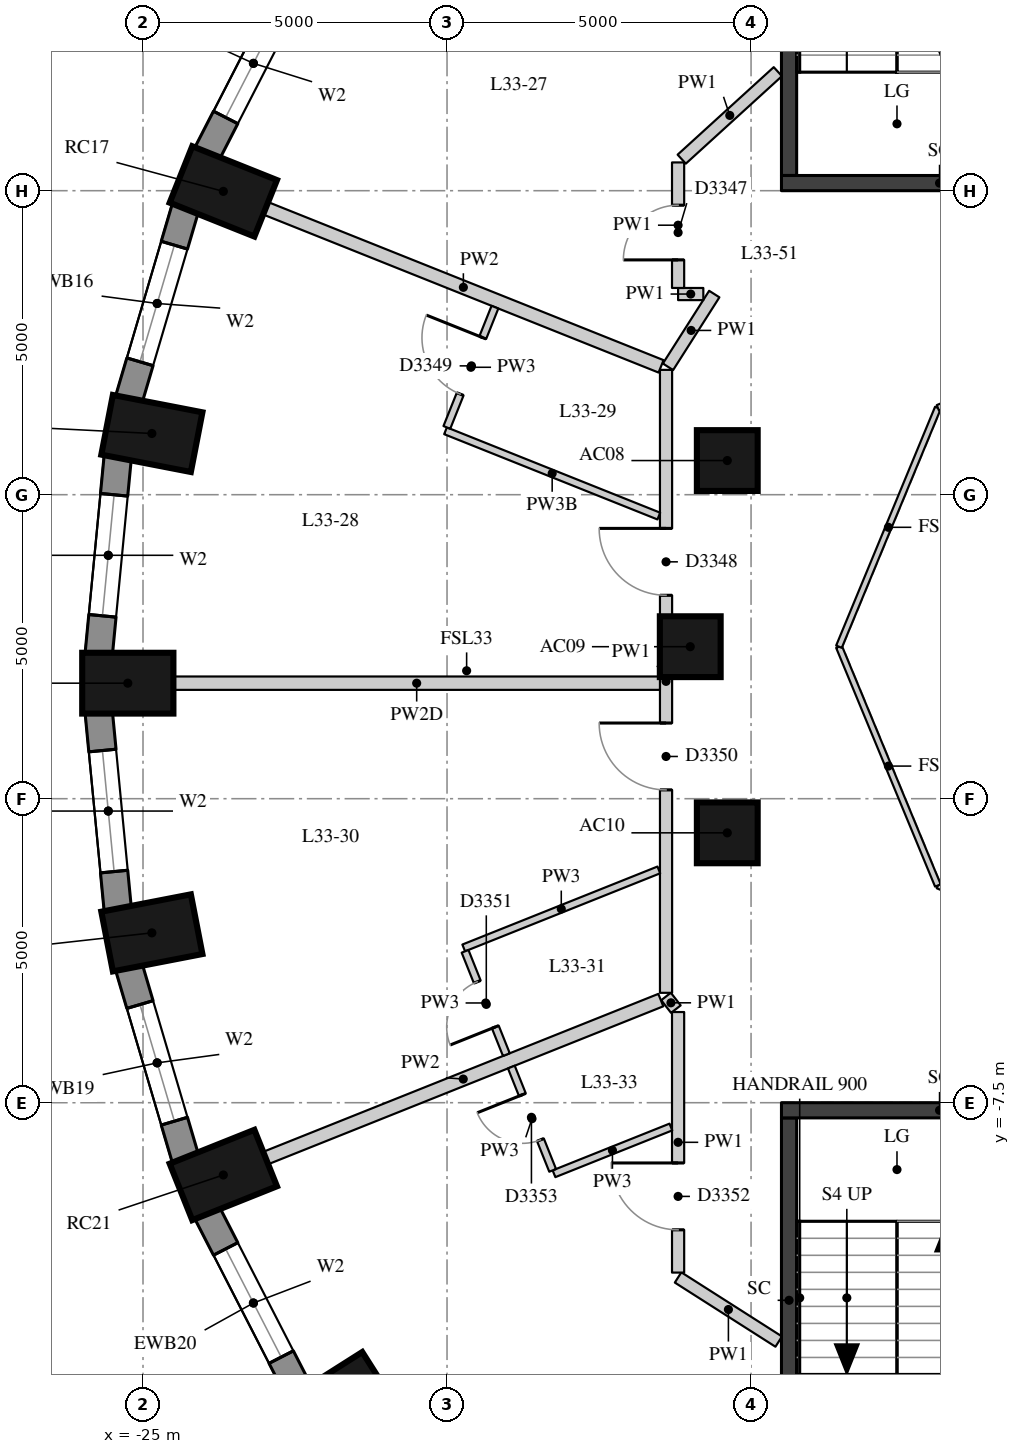
"""IFC4 building model, lengths in metres.
Left out: names, types, materials, properties, quantities, classifications, styles, units other than length and angle.
Written with IfcOpenShell. Run it as: python <this file> out.ifc"""

import sys

from ifc_helpers import new_model, si_unit, direction, frame, frame_2d, origin, origin_2d, place, context, subcontext, project, spatial, rectangle, extrude, element, fill, save


model = new_model("IFC4")
c1 = context("Model", 3, precision=1e-05, world=origin(), true_north=direction((0.0, 1.0)))
c2 = subcontext(c1, "Body", "Model", "MODEL_VIEW")
j1 = project(units=[si_unit("LENGTHUNIT", "METRE"), si_unit("PLANEANGLEUNIT", "RADIAN")], contexts=[c1])
p1 = place(None, origin())
s1 = spatial("IfcSite", under=j1, at=p1, CompositionType="ELEMENT")
p2 = place(p1, origin())
s2 = spatial("IfcBuilding", under=s1, at=p2, CompositionType="ELEMENT")
p3 = place(p2, frame((0.0, 0.0, 118.6)))
s3 = spatial("IfcBuildingStorey", under=s2, at=p3, CompositionType="ELEMENT", Elevation=118.6)
for number, where, z_axis, x_axis in (
    (1, (-23.679, 7.489, 0.0), (0.0, 0.0, 1.0), (-0.929, 0.371, 0.0)),
    (2, (-24.854, 3.507, 0.0), (0.0, 0.0, 1.0), (-0.982, 0.19, 0.0)),
    (3, (-25.25, -0.6, 0.0), (0.0, 0.0, 1.0), (-1.0, 0.0, 0.0)),
    (4, (-24.854, -4.707, 0.0), (0.0, 0.0, 1.0), (-0.982, -0.19, 0.0)),
    (5, (-23.679, -8.689, 0.0), (0.0, 0.0, 1.0), (-0.929, -0.371, 0.0)),
    (6, (-21.76, -12.425, 0.0), (0.0, 0.0, 1.0), (-0.845, -0.536, 0.0)),
):
    element("IfcColumn", number, at=place(p3, frame(where, z_axis=z_axis, x_axis=x_axis)), inside=s3, PredefinedType="COLUMN", context=c2, shape_type="SweptSolid", body=[
        extrude(rectangle(XDim=1.5, YDim=1.0, at=origin_2d()), origin(), (0.0, 0.0, 1.0), 3.3),
    ])
for number, where, z_axis, x_axis in (
    (7, (-15.391, 3.062, 0.0), (0.0, 0.0, 1.0), (1.0, 0.0, 0.0)),
    (8, (-16.0, 0.0, 0.0), (0.0, 0.0, 1.0), (1.0, 0.0, 0.0)),
    (9, (-15.391, -3.062, 0.0), (0.0, 0.0, 1.0), (1.0, 0.0, 0.0)),
):
    element("IfcColumn", number, at=place(p3, frame(where, z_axis=z_axis, x_axis=x_axis)), inside=s3, PredefinedType="COLUMN", context=c2, shape_type="SweptSolid", body=[
        extrude(rectangle(XDim=1.0, YDim=1.0, at=origin_2d()), origin(), (0.0, 0.0, 1.0), 3.3),
    ])
p4 = place(p3, frame((-22.423, 11.077, 0.0), z_axis=(0.0, 0.0, 1.0), x_axis=(-0.456828186229, -0.889554949549, 0.0)))
e10 = element("IfcWall", 10, at=p4, inside=s3, PredefinedType="SOLIDWALL", context=c2, shape_type="SweptSolid", body=[
    extrude(rectangle(XDim=3.333, YDim=0.45, at=frame_2d((1.667, 0.0))), origin(), (0.0, 0.0, 1.0), 3.02),
])
p5 = place(p4, frame((0.666, 0.0, 0.4)))
e11 = element("IfcOpeningElement", 11, at=p5, cuts=e10, PredefinedType="OPENING", context=c2, shape_type="SweptSolid", body=[
    extrude(rectangle(XDim=2.0, YDim=1.75, at=frame_2d((1.0, 0.875))), frame((0.0, 0.235, 0.0), z_axis=(0.0, -1.0, 0.0), x_axis=(1.0, 0.0, 0.0)), (0.0, 0.0, 1.0), 0.47),
])
p6 = place(p3, frame((-24.302, 7.221, 0.0), z_axis=(0.0, 0.0, 1.0), x_axis=(-0.283071248438, -0.959098883488, 0.0)))
e12 = element("IfcWall", 12, at=p6, inside=s3, PredefinedType="SOLIDWALL", context=c2, shape_type="SweptSolid", body=[
    extrude(rectangle(XDim=3.286, YDim=0.45, at=frame_2d((1.643, 0.0))), origin(), (0.0, 0.0, 1.0), 3.02),
])
p7 = place(p6, frame((0.643, 0.0, 0.4)))
e13 = element("IfcOpeningElement", 13, at=p7, cuts=e12, PredefinedType="OPENING", context=c2, shape_type="SweptSolid", body=[
    extrude(rectangle(XDim=2.0, YDim=1.75, at=frame_2d((1.0, 0.875))), frame((0.0, 0.235, 0.0), z_axis=(0.0, -1.0, 0.0), x_axis=(1.0, 0.0, 0.0)), (0.0, 0.0, 1.0), 0.47),
])
p8 = place(p3, frame((-25.415, 3.126, 0.0), z_axis=(0.0, 0.0, 1.0), x_axis=(-0.095967726544, -0.995384446062, 0.0)))
e14 = element("IfcWall", 14, at=p8, inside=s3, PredefinedType="SOLIDWALL", context=c2, shape_type="SweptSolid", body=[
    extrude(rectangle(XDim=3.261, YDim=0.45, at=frame_2d((1.631, 0.0))), origin(), (0.0, 0.0, 1.0), 3.02),
])
p9 = place(p8, frame((0.631, 0.0, 0.4)))
e15 = element("IfcOpeningElement", 15, at=p9, cuts=e14, PredefinedType="OPENING", context=c2, shape_type="SweptSolid", body=[
    extrude(rectangle(XDim=2.0, YDim=1.75, at=frame_2d((1.0, 0.875))), frame((0.0, 0.235, 0.0), z_axis=(0.0, -1.0, 0.0), x_axis=(1.0, 0.0, 0.0)), (0.0, 0.0, 1.0), 0.47),
])
p10 = place(p3, frame((-25.728, -1.08, 0.0), z_axis=(0.0, 0.0, 1.0), x_axis=(0.095967726544, -0.995384446062, 0.0)))
e16 = element("IfcWall", 16, at=p10, inside=s3, PredefinedType="SOLIDWALL", context=c2, shape_type="SweptSolid", body=[
    extrude(rectangle(XDim=3.261, YDim=0.45, at=frame_2d((1.631, 0.0))), origin(), (0.0, 0.0, 1.0), 3.02),
])
p11 = place(p10, frame((0.631, 0.0, 0.4)))
e17 = element("IfcOpeningElement", 17, at=p11, cuts=e16, PredefinedType="OPENING", context=c2, shape_type="SweptSolid", body=[
    extrude(rectangle(XDim=2.0, YDim=1.75, at=frame_2d((1.0, 0.875))), frame((0.0, 0.235, 0.0), z_axis=(0.0, -1.0, 0.0), x_axis=(1.0, 0.0, 0.0)), (0.0, 0.0, 1.0), 0.47),
])
p12 = place(p3, frame((-25.232, -5.269, 0.0), z_axis=(0.0, 0.0, 1.0), x_axis=(0.283051078697, -0.959104836214, 0.0)))
e18 = element("IfcWall", 18, at=p12, inside=s3, PredefinedType="SOLIDWALL", context=c2, shape_type="SweptSolid", body=[
    extrude(rectangle(XDim=3.286, YDim=0.45, at=frame_2d((1.643, 0.0))), origin(), (0.0, 0.0, 1.0), 3.02),
])
p13 = place(p12, frame((0.643, 0.0, 0.4)))
e19 = element("IfcOpeningElement", 19, at=p13, cuts=e18, PredefinedType="OPENING", context=c2, shape_type="SweptSolid", body=[
    extrude(rectangle(XDim=2.0, YDim=1.75, at=frame_2d((1.0, 0.875))), frame((0.0, 0.235, 0.0), z_axis=(0.0, -1.0, 0.0), x_axis=(1.0, 0.0, 0.0)), (0.0, 0.0, 1.0), 0.47),
])
p14 = place(p3, frame((-23.945, -9.312, 0.0), z_axis=(0.0, 0.0, 1.0), x_axis=(0.456828186229, -0.889554949549, 0.0)))
e20 = element("IfcWall", 20, at=p14, inside=s3, PredefinedType="SOLIDWALL", context=c2, shape_type="SweptSolid", body=[
    extrude(rectangle(XDim=3.333, YDim=0.45, at=frame_2d((1.667, 0.0))), origin(), (0.0, 0.0, 1.0), 3.02),
])
p15 = place(p14, frame((0.666, 0.0, 0.4)))
e21 = element("IfcOpeningElement", 21, at=p15, cuts=e20, PredefinedType="OPENING", context=c2, shape_type="SweptSolid", body=[
    extrude(rectangle(XDim=2.0, YDim=1.75, at=frame_2d((1.0, 0.875))), frame((0.0, 0.235, 0.0), z_axis=(0.0, -1.0, 0.0), x_axis=(1.0, 0.0, 0.0)), (0.0, 0.0, 1.0), 0.47),
])
p16 = place(p3, frame((-14.375, 7.75, -0.28), z_axis=(0.0, 0.0, 1.0), x_axis=(0.0, 1.0, 0.0)))
e22 = element("IfcWall", 22, at=p16, inside=s3, PredefinedType="SHEAR", context=c2, shape_type="SweptSolid", body=[
    extrude(rectangle(XDim=6.0, YDim=0.25, at=frame_2d((3.0, 0.0))), origin(), (0.0, 0.0, 1.0), 3.3),
])
p17 = place(p3, frame((-14.5, 7.625, -0.28), z_axis=(0.0, 0.0, 1.0), x_axis=(1.0, 0.0, 0.0)))
e23 = element("IfcWall", 23, at=p17, inside=s3, PredefinedType="SHEAR", context=c2, shape_type="SweptSolid", body=[
    extrude(rectangle(XDim=5.2, YDim=0.25, at=frame_2d((2.6, 0.0))), origin(), (0.0, 0.0, 1.0), 3.3),
])
p18 = place(p3, frame((-14.375, -13.75, -0.28), z_axis=(0.0, 0.0, 1.0), x_axis=(0.0, 1.0, 0.0)))
e24 = element("IfcWall", 24, at=p18, inside=s3, PredefinedType="SHEAR", context=c2, shape_type="SweptSolid", body=[
    extrude(rectangle(XDim=6.0, YDim=0.25, at=frame_2d((3.0, 0.0))), origin(), (0.0, 0.0, 1.0), 3.3),
])
p19 = place(p3, frame((-14.5, -7.625, -0.28), z_axis=(0.0, 0.0, 1.0), x_axis=(1.0, 0.0, 0.0)))
e25 = element("IfcWall", 25, at=p19, inside=s3, PredefinedType="SHEAR", context=c2, shape_type="SweptSolid", body=[
    extrude(rectangle(XDim=5.2, YDim=0.25, at=frame_2d((2.6, 0.0))), origin(), (0.0, 0.0, 1.0), 3.3),
])
p20 = place(p3, frame((-14.545, -11.429, 0.0), z_axis=(0.0, 0.0, 1.0), x_axis=(-0.843261732334, 0.537503163507, 0.0)))
e26 = element("IfcWall", 26, at=p20, inside=s3, PredefinedType="PARTITIONING", context=c2, shape_type="SweptSolid", body=[
    extrude(rectangle(XDim=1.963, YDim=0.2, at=frame_2d((0.981, 0.0))), origin(), (0.0, 0.0, 1.0), 3.02),
])
p21 = place(p3, frame((-16.2, -10.294, 0.0), z_axis=(0.0, 0.0, 1.0), x_axis=(0.0, 1.0, 0.0)))
e27 = element("IfcWall", 27, at=p21, inside=s3, PredefinedType="PARTITIONING", context=c2, shape_type="SweptSolid", body=[
    extrude(rectangle(XDim=4.285, YDim=0.2, at=frame_2d((2.143, 0.0))), origin(), (0.0, 0.0, 1.0), 3.02),
])
p22 = place(p21, frame((0.703, 0.0, 0.0)))
e28 = element("IfcOpeningElement", 28, at=p22, cuts=e27, PredefinedType="OPENING", context=c2, shape_type="SweptSolid", body=[
    extrude(rectangle(XDim=1.1, YDim=2.1, at=frame_2d((0.55, 1.05))), frame((0.0, 0.11, 0.0), z_axis=(0.0, -1.0, 0.0), x_axis=(1.0, 0.0, 0.0)), (0.0, 0.0, 1.0), 0.22),
])
p23 = place(p3, frame((-16.237, -5.961, 0.0), z_axis=(0.0, 0.0, 1.0), x_axis=(-0.61310674242, 0.790000077468, 0.0)))
e29 = element("IfcWall", 29, at=p23, inside=s3, PredefinedType="PARTITIONING", context=c2, shape_type="SweptSolid", body=[
    extrude(rectangle(XDim=0.264, YDim=0.2, at=frame_2d((0.132, 0.0))), origin(), (0.0, 0.0, 1.0), 3.02),
])
p24 = place(p3, frame((-16.398, -5.693, 0.0), z_axis=(0.0, 0.0, 1.0), x_axis=(0.0, 1.0, 0.0)))
e30 = element("IfcWall", 30, at=p24, inside=s3, PredefinedType="PARTITIONING", context=c2, shape_type="SweptSolid", body=[
    extrude(rectangle(XDim=10.246, YDim=0.2, at=frame_2d((5.123, 0.0))), origin(), (0.0, 0.0, 1.0), 3.02),
])
p25 = place(p24, frame((6.539, 0.0, 0.0)))
e31 = element("IfcOpeningElement", 31, at=p25, cuts=e30, PredefinedType="OPENING", context=c2, shape_type="SweptSolid", body=[
    extrude(rectangle(XDim=1.1, YDim=2.1, at=frame_2d((0.55, 1.05))), frame((0.0, 0.11, 0.0), z_axis=(0.0, -1.0, 0.0), x_axis=(1.0, 0.0, 0.0)), (0.0, 0.0, 1.0), 0.22),
])
p26 = place(p24, frame((3.337, 0.0, 0.0)))
e32 = element("IfcOpeningElement", 32, at=p26, cuts=e30, PredefinedType="OPENING", context=c2, shape_type="SweptSolid", body=[
    extrude(rectangle(XDim=1.1, YDim=2.1, at=frame_2d((0.55, 1.05))), frame((0.0, 0.11, 0.0), z_axis=(0.0, -1.0, 0.0), x_axis=(1.0, 0.0, 0.0)), (0.0, 0.0, 1.0), 0.22),
])
p27 = place(p3, frame((-16.366, 4.604, 0.0), z_axis=(0.0, 0.0, 1.0), x_axis=(0.536775234189, 0.843725279911, 0.0)))
e33 = element("IfcWall", 33, at=p27, inside=s3, PredefinedType="PARTITIONING", context=c2, shape_type="SweptSolid", body=[
    extrude(rectangle(XDim=1.418, YDim=0.2, at=frame_2d((0.709, 0.0))), origin(), (0.0, 0.0, 1.0), 3.02),
])
p28 = place(p3, frame((-15.785, 5.8, 0.0), z_axis=(0.0, 0.0, 1.0), x_axis=(-1.0, 0.0, 0.0)))
e34 = element("IfcWall", 34, at=p28, inside=s3, PredefinedType="PARTITIONING", context=c2, shape_type="SweptSolid", body=[
    extrude(rectangle(XDim=0.415, YDim=0.2, at=frame_2d((0.208, 0.0))), origin(), (0.0, 0.0, 1.0), 3.02),
])
p29 = place(p3, frame((-16.2, 5.9, 0.0), z_axis=(0.0, 0.0, 1.0), x_axis=(0.0, 1.0, 0.0)))
e35 = element("IfcWall", 35, at=p29, inside=s3, PredefinedType="PARTITIONING", context=c2, shape_type="SweptSolid", body=[
    extrude(rectangle(XDim=2.065, YDim=0.2, at=frame_2d((1.032, 0.0))), origin(), (0.0, 0.0, 1.0), 3.02),
])
p30 = place(p29, frame((0.462, 0.0, 0.0)))
e36 = element("IfcOpeningElement", 36, at=p30, cuts=e35, PredefinedType="OPENING", context=c2, shape_type="SweptSolid", body=[
    extrude(rectangle(XDim=0.9, YDim=2.1, at=frame_2d((0.45, 1.05))), frame((0.0, 0.11, 0.0), z_axis=(0.0, -1.0, 0.0), x_axis=(1.0, 0.0, 0.0)), (0.0, 0.0, 1.0), 0.22),
])
p31 = place(p3, frame((-16.14, 8.019, 0.0), z_axis=(0.0, 0.0, 1.0), x_axis=(0.739392120684, 0.673275049197, 0.0)))
e37 = element("IfcWall", 37, at=p31, inside=s3, PredefinedType="PARTITIONING", context=c2, shape_type="SweptSolid", body=[
    extrude(rectangle(XDim=2.138, YDim=0.2, at=frame_2d((1.069, 0.0))), origin(), (0.0, 0.0, 1.0), 3.02),
])
p32 = place(p3, frame((-22.983, 7.21, 0.0), z_axis=(0.0, 0.0, 1.0), x_axis=(0.928548801607, -0.371210348771, 0.0)))
e38 = element("IfcWall", 38, at=p32, inside=s3, PredefinedType="PARTITIONING", context=c2, shape_type="SweptSolid", body=[
    extrude(rectangle(XDim=7.003, YDim=0.22, at=frame_2d((3.501, 0.0))), origin(), (0.0, 0.0, 1.0), 3.02),
])
p33 = place(p3, frame((-24.5, -0.6, 0.0), z_axis=(0.0, 0.0, 1.0), x_axis=(1.0, 0.0, 0.0)))
e39 = element("IfcWall", 39, at=p33, inside=s3, PredefinedType="PARTITIONING", context=c2, shape_type="SweptSolid", body=[
    extrude(rectangle(XDim=8.002, YDim=0.22, at=frame_2d((4.001, 0.0))), origin(), (0.0, 0.0, 1.0), 2.47),
])
p34 = place(p3, frame((-22.983, -8.41, 0.0), z_axis=(0.0, 0.0, 1.0), x_axis=(0.928551252469, 0.371204218105, 0.0)))
e40 = element("IfcWall", 40, at=p34, inside=s3, PredefinedType="PARTITIONING", context=c2, shape_type="SweptSolid", body=[
    extrude(rectangle(XDim=6.999, YDim=0.22, at=frame_2d((3.499, 0.0))), origin(), (0.0, 0.0, 1.0), 3.02),
])
p35 = place(p3, frame((-16.517, 2.148, 0.0), z_axis=(0.0, 0.0, 1.0), x_axis=(-0.928534615374, 0.37124583237, 0.0)))
e41 = element("IfcWall", 41, at=p35, inside=s3, PredefinedType="PARTITIONING", context=c2, shape_type="SweptSolid", body=[
    extrude(rectangle(XDim=3.778, YDim=0.12, at=frame_2d((1.889, 0.0))), origin(), (0.0, 0.0, 1.0), 2.47),
])
p36 = place(p3, frame((-16.517, -3.672, 0.0), z_axis=(0.0, 0.0, 1.0), x_axis=(-0.928554629191, -0.371195771268, 0.0)))
e42 = element("IfcWall", 42, at=p36, inside=s3, PredefinedType="PARTITIONING", context=c2, shape_type="SweptSolid", body=[
    extrude(rectangle(XDim=3.456, YDim=0.12, at=frame_2d((1.728, 0.0))), origin(), (0.0, 0.0, 1.0), 3.02),
])
p37 = place(p3, frame((-16.319, -7.9, 0.0), z_axis=(0.0, 0.0, 1.0), x_axis=(-0.92852548478, -0.371268668371, 0.0)))
e43 = element("IfcWall", 43, at=p37, inside=s3, PredefinedType="PARTITIONING", context=c2, shape_type="SweptSolid", body=[
    extrude(rectangle(XDim=2.07, YDim=0.12, at=frame_2d((1.035, 0.0))), origin(), (0.0, 0.0, 1.0), 3.02),
])
p38 = place(p3, frame((-20.003, 3.607, 0.0), z_axis=(0.0, 0.0, 1.0), x_axis=(0.371351153758, 0.928492498948, 0.0)))
e44 = element("IfcWall", 44, at=p38, inside=s3, PredefinedType="PARTITIONING", context=c2, shape_type="SweptSolid", body=[
    extrude(rectangle(XDim=2.13, YDim=0.12, at=frame_2d((1.065, 0.0))), origin(), (0.0, 0.0, 1.0), 3.02),
])
p39 = place(p38, frame((0.59, 0.0, 0.0)))
e45 = element("IfcOpeningElement", 45, at=p39, cuts=e44, PredefinedType="OPENING", context=c2, shape_type="SweptSolid", body=[
    extrude(rectangle(XDim=1.0, YDim=2.1, at=frame_2d((0.5, 1.05))), frame((0.0, 0.07, 0.0), z_axis=(0.0, -1.0, 0.0), x_axis=(1.0, 0.0, 0.0)), (0.0, 0.0, 1.0), 0.14),
])
p40 = place(p3, frame((-19.703, -5.01, 0.0), z_axis=(0.0, 0.0, 1.0), x_axis=(0.371229680537, -0.928541073022, 0.0)))
e46 = element("IfcWall", 46, at=p40, inside=s3, PredefinedType="PARTITIONING", context=c2, shape_type="SweptSolid", body=[
    extrude(rectangle(XDim=1.83, YDim=0.12, at=frame_2d((0.915, 0.0))), origin(), (0.0, 0.0, 1.0), 3.02),
])
p41 = place(p40, frame((0.54, 0.0, 0.0)))
e47 = element("IfcOpeningElement", 47, at=p41, cuts=e46, PredefinedType="OPENING", context=c2, shape_type="SweptSolid", body=[
    extrude(rectangle(XDim=0.8, YDim=2.1, at=frame_2d((0.4, 1.05))), frame((0.0, 0.07, 0.0), z_axis=(0.0, -1.0, 0.0), x_axis=(1.0, 0.0, 0.0)), (0.0, 0.0, 1.0), 0.14),
])
p42 = place(p3, frame((-18.263, -8.613, 0.0), z_axis=(0.0, 0.0, 1.0), x_axis=(-0.371229680537, 0.928541073022, 0.0)))
e48 = element("IfcWall", 48, at=p42, inside=s3, PredefinedType="PARTITIONING", context=c2, shape_type="SweptSolid", body=[
    extrude(rectangle(XDim=1.83, YDim=0.12, at=frame_2d((0.915, 0.0))), origin(), (0.0, 0.0, 1.0), 3.02),
])
p43 = place(p42, frame((0.54, 0.0, 0.0)))
e49 = element("IfcOpeningElement", 49, at=p43, cuts=e48, PredefinedType="OPENING", context=c2, shape_type="SweptSolid", body=[
    extrude(rectangle(XDim=0.8, YDim=2.1, at=frame_2d((0.4, 1.05))), frame((0.0, 0.07, 0.0), z_axis=(0.0, -1.0, 0.0), x_axis=(1.0, 0.0, 0.0)), (0.0, 0.0, 1.0), 0.14),
])
for number, where, z_axis, x_axis in (
    (50, (-8.0, -5.554, 0.0), (0.0, 0.0, 1.0), (-0.924, 0.383, 0.0)),
    (51, (-11.927, -3.927, 0.0), (0.0, 0.0, 1.0), (-0.383, 0.924, 0.0)),
    (52, (-13.554, 0.0, 0.0), (0.0, 0.0, 1.0), (0.383, 0.924, 0.0)),
    (53, (-11.927, 3.927, 0.0), (0.0, 0.0, 1.0), (0.924, 0.383, 0.0)),
):
    element("IfcWall", number, at=place(p3, frame(where, z_axis=z_axis, x_axis=x_axis)), inside=s3, PredefinedType="PARTITIONING", context=c2, shape_type="SweptSolid", body=[
        extrude(rectangle(XDim=4.251, YDim=0.1, at=frame_2d((2.125, 0.0))), origin(), (0.0, 0.0, 1.0), 3.02),
    ])
p44 = place(p5, origin())
e54 = element("IfcWindow", 54, at=p44, inside=s3, PartitioningType="SINGLE_PANEL", PredefinedType="WINDOW", context=c2, shape_type="SweptSolid", body=[
    extrude(rectangle(XDim=2.0, YDim=1.75, at=frame_2d((1.0, 0.875))), frame((0.0, 0.035, 0.0), z_axis=(0.0, -1.0, 0.0), x_axis=(1.0, 0.0, 0.0)), (0.0, 0.0, 1.0), 0.06),
])
fill(e11, e54)
p45 = place(p7, origin())
e55 = element("IfcWindow", 55, at=p45, inside=s3, PartitioningType="SINGLE_PANEL", PredefinedType="WINDOW", context=c2, shape_type="SweptSolid", body=[
    extrude(rectangle(XDim=2.0, YDim=1.75, at=frame_2d((1.0, 0.875))), frame((0.0, 0.035, 0.0), z_axis=(0.0, -1.0, 0.0), x_axis=(1.0, 0.0, 0.0)), (0.0, 0.0, 1.0), 0.06),
])
fill(e13, e55)
p46 = place(p9, origin())
e56 = element("IfcWindow", 56, at=p46, inside=s3, PartitioningType="SINGLE_PANEL", PredefinedType="WINDOW", context=c2, shape_type="SweptSolid", body=[
    extrude(rectangle(XDim=2.0, YDim=1.75, at=frame_2d((1.0, 0.875))), frame((0.0, 0.035, 0.0), z_axis=(0.0, -1.0, 0.0), x_axis=(1.0, 0.0, 0.0)), (0.0, 0.0, 1.0), 0.06),
])
fill(e15, e56)
p47 = place(p11, origin())
e57 = element("IfcWindow", 57, at=p47, inside=s3, PartitioningType="SINGLE_PANEL", PredefinedType="WINDOW", context=c2, shape_type="SweptSolid", body=[
    extrude(rectangle(XDim=2.0, YDim=1.75, at=frame_2d((1.0, 0.875))), frame((0.0, 0.035, 0.0), z_axis=(0.0, -1.0, 0.0), x_axis=(1.0, 0.0, 0.0)), (0.0, 0.0, 1.0), 0.06),
])
fill(e17, e57)
p48 = place(p13, origin())
e58 = element("IfcWindow", 58, at=p48, inside=s3, PartitioningType="SINGLE_PANEL", PredefinedType="WINDOW", context=c2, shape_type="SweptSolid", body=[
    extrude(rectangle(XDim=2.0, YDim=1.75, at=frame_2d((1.0, 0.875))), frame((0.0, 0.035, 0.0), z_axis=(0.0, -1.0, 0.0), x_axis=(1.0, 0.0, 0.0)), (0.0, 0.0, 1.0), 0.06),
])
fill(e19, e58)
p49 = place(p15, origin())
e59 = element("IfcWindow", 59, at=p49, inside=s3, PartitioningType="SINGLE_PANEL", PredefinedType="WINDOW", context=c2, shape_type="SweptSolid", body=[
    extrude(rectangle(XDim=2.0, YDim=1.75, at=frame_2d((1.0, 0.875))), frame((0.0, 0.035, 0.0), z_axis=(0.0, -1.0, 0.0), x_axis=(1.0, 0.0, 0.0)), (0.0, 0.0, 1.0), 0.06),
])
fill(e21, e59)
p50 = place(p30, origin())
e60 = element("IfcDoor", 60, at=p50, inside=s3, OperationType="SINGLE_SWING_LEFT", PredefinedType="DOOR", context=c2, shape_type="SweptSolid", body=[
    extrude(rectangle(XDim=0.9, YDim=2.1, at=frame_2d((0.45, 1.05))), frame((0.0, 0.025, 0.0), z_axis=(0.0, -1.0, 0.0), x_axis=(1.0, 0.0, 0.0)), (0.0, 0.0, 1.0), 0.05),
])
fill(e36, e60)
p51 = place(p25, origin())
e61 = element("IfcDoor", 61, at=p51, inside=s3, OperationType="SINGLE_SWING_RIGHT", PredefinedType="DOOR", context=c2, shape_type="SweptSolid", body=[
    extrude(rectangle(XDim=1.1, YDim=2.1, at=frame_2d((0.55, 1.05))), frame((0.0, 0.025, 0.0), z_axis=(0.0, -1.0, 0.0), x_axis=(1.0, 0.0, 0.0)), (0.0, 0.0, 1.0), 0.05),
])
fill(e31, e61)
p52 = place(p39, origin())
e62 = element("IfcDoor", 62, at=p52, inside=s3, OperationType="SINGLE_SWING_RIGHT", PredefinedType="DOOR", context=c2, shape_type="SweptSolid", body=[
    extrude(rectangle(XDim=1.0, YDim=2.1, at=frame_2d((0.5, 1.05))), frame((0.0, 0.025, 0.0), z_axis=(0.0, -1.0, 0.0), x_axis=(1.0, 0.0, 0.0)), (0.0, 0.0, 1.0), 0.05),
])
fill(e45, e62)
p53 = place(p26, origin())
e63 = element("IfcDoor", 63, at=p53, inside=s3, OperationType="SINGLE_SWING_RIGHT", PredefinedType="DOOR", context=c2, shape_type="SweptSolid", body=[
    extrude(rectangle(XDim=1.1, YDim=2.1, at=frame_2d((0.55, 1.05))), frame((0.0, 0.025, 0.0), z_axis=(0.0, -1.0, 0.0), x_axis=(1.0, 0.0, 0.0)), (0.0, 0.0, 1.0), 0.05),
])
fill(e32, e63)
p54 = place(p41, origin())
e64 = element("IfcDoor", 64, at=p54, inside=s3, OperationType="SINGLE_SWING_LEFT", PredefinedType="DOOR", context=c2, shape_type="SweptSolid", body=[
    extrude(rectangle(XDim=0.8, YDim=2.1, at=frame_2d((0.4, 1.05))), frame((0.0, 0.025, 0.0), z_axis=(0.0, -1.0, 0.0), x_axis=(1.0, 0.0, 0.0)), (0.0, 0.0, 1.0), 0.05),
])
fill(e47, e64)
p55 = place(p22, origin())
e65 = element("IfcDoor", 65, at=p55, inside=s3, OperationType="SINGLE_SWING_RIGHT", PredefinedType="DOOR", context=c2, shape_type="SweptSolid", body=[
    extrude(rectangle(XDim=1.1, YDim=2.1, at=frame_2d((0.55, 1.05))), frame((0.0, 0.025, 0.0), z_axis=(0.0, -1.0, 0.0), x_axis=(1.0, 0.0, 0.0)), (0.0, 0.0, 1.0), 0.05),
])
fill(e28, e65)
p56 = place(p43, origin())
e66 = element("IfcDoor", 66, at=p56, inside=s3, OperationType="SINGLE_SWING_RIGHT", PredefinedType="DOOR", context=c2, shape_type="SweptSolid", body=[
    extrude(rectangle(XDim=0.8, YDim=2.1, at=frame_2d((0.4, 1.05))), frame((0.0, 0.025, 0.0), z_axis=(0.0, -1.0, 0.0), x_axis=(1.0, 0.0, 0.0)), (0.0, 0.0, 1.0), 0.05),
])
fill(e49, e66)
save(model, sys.argv[1])
